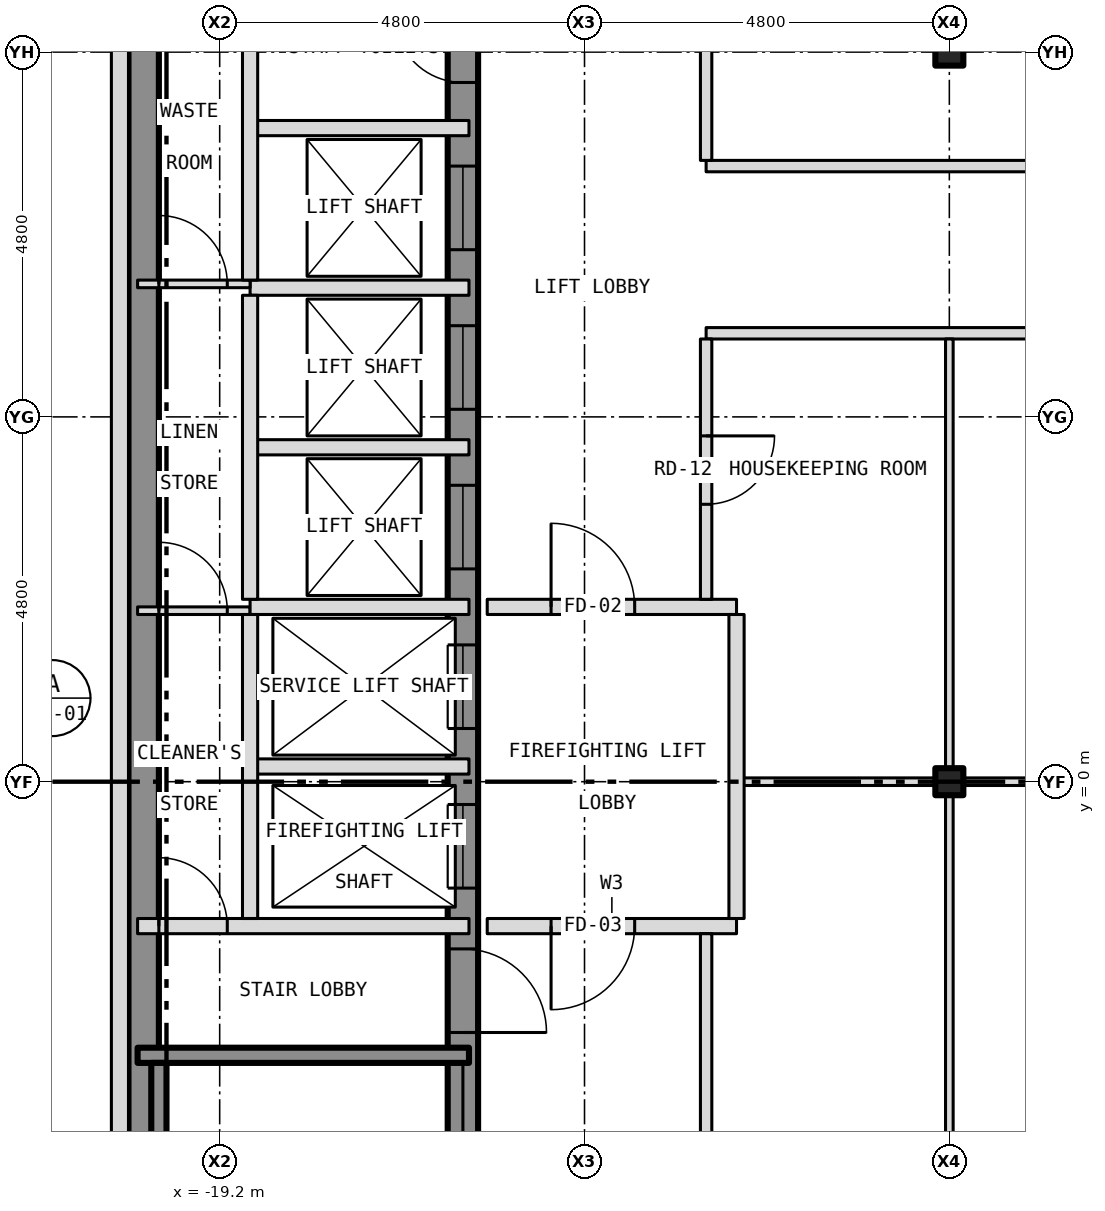
"""IFC4 building model, lengths in metres.
Left out: names, types, materials, properties, quantities, classifications, styles, units other than length and angle.
Written with IfcOpenShell. Run it as: python <this file> out.ifc"""

import sys

from ifc_helpers import new_model, si_unit, direction, frame, frame_2d, origin, origin_2d, place, context, subcontext, project, spatial, rectangle, i_section, extrude, element, fill, save


model = new_model("IFC4")
c1 = context("Model", 3, precision=1e-05, world=origin(), true_north=direction((0.0, 1.0)))
c2 = subcontext(c1, "Body", "Model", "MODEL_VIEW")
j1 = project(units=[si_unit("LENGTHUNIT", "METRE"), si_unit("PLANEANGLEUNIT", "RADIAN")], contexts=[c1])
p1 = place(None, origin())
s1 = spatial("IfcSite", under=j1, at=p1, CompositionType="ELEMENT")
p2 = place(p1, origin())
s2 = spatial("IfcBuilding", under=s1, at=p2, CompositionType="ELEMENT")
p3 = place(p2, frame((0.0, 0.0, 251.5)))
s3 = spatial("IfcBuildingStorey", under=s2, at=p3, CompositionType="ELEMENT", Elevation=251.5)
for number, where, z_axis, x_axis in (
    (1, (-9.6, 0.0, -0.15), (0.0, 0.0, 1.0), (1.0, 0.0, 0.0)),
    (2, (-9.6, 9.6, -0.15), (0.0, 0.0, 1.0), (1.0, 0.0, 0.0)),
):
    element("IfcColumn", number, at=place(p3, frame(where, z_axis=z_axis, x_axis=x_axis)), inside=s3, PredefinedType="COLUMN", context=c2, shape_type="SweptSolid", body=[
        extrude(i_section(OverallWidth=0.368, OverallDepth=0.356, WebThickness=0.011, FlangeThickness=0.018, at=origin_2d()), origin(), (0.0, 0.0, 1.0), 3.5),
    ])
p4 = place(p3, frame((-16.0, -10.8, 0.0), z_axis=(0.0, 0.0, 1.0), x_axis=(0.0, 1.0, 0.0)))
e3 = element("IfcWall", 3, at=p4, inside=s3, PredefinedType="SHEAR", context=c2, shape_type="SweptSolid", body=[
    extrude(rectangle(XDim=21.6, YDim=0.4, at=frame_2d((10.8, 0.0))), origin(), (0.0, 0.0, 1.0), 3.25),
])
p5 = place(p4, frame((9.4, 0.0, 0.0)))
e4 = element("IfcOpeningElement", 4, at=p5, cuts=e3, PredefinedType="OPENING", context=c2, shape_type="SweptSolid", body=[
    extrude(rectangle(XDim=1.1, YDim=2.1, at=frame_2d((0.55, 1.05))), frame((0.0, 0.212, 0.0), z_axis=(0.0, -1.0, 0.0), x_axis=(1.0, 0.0, 0.0)), (0.0, 0.0, 1.0), 0.424),
])
p6 = place(p4, frame((11.5, 0.0, 0.0)))
e5 = element("IfcOpeningElement", 5, at=p6, cuts=e3, PredefinedType="OPENING", context=c2, shape_type="SweptSolid", body=[
    extrude(rectangle(XDim=1.1, YDim=2.1, at=frame_2d((0.55, 1.05))), frame((0.0, 0.212, 0.0), z_axis=(0.0, -1.0, 0.0), x_axis=(1.0, 0.0, 0.0)), (0.0, 0.0, 1.0), 0.424),
])
p7 = place(p4, frame((13.6, 0.0, 0.0)))
e6 = element("IfcOpeningElement", 6, at=p7, cuts=e3, PredefinedType="OPENING", context=c2, shape_type="SweptSolid", body=[
    extrude(rectangle(XDim=1.1, YDim=2.1, at=frame_2d((0.55, 1.05))), frame((0.0, 0.212, 0.0), z_axis=(0.0, -1.0, 0.0), x_axis=(1.0, 0.0, 0.0)), (0.0, 0.0, 1.0), 0.424),
])
p8 = place(p4, frame((15.7, 0.0, 0.0)))
e7 = element("IfcOpeningElement", 7, at=p8, cuts=e3, PredefinedType="OPENING", context=c2, shape_type="SweptSolid", body=[
    extrude(rectangle(XDim=1.1, YDim=2.1, at=frame_2d((0.55, 1.05))), frame((0.0, 0.212, 0.0), z_axis=(0.0, -1.0, 0.0), x_axis=(1.0, 0.0, 0.0)), (0.0, 0.0, 1.0), 0.424),
])
p9 = place(p4, frame((17.8, 0.0, 0.0)))
e8 = element("IfcOpeningElement", 8, at=p9, cuts=e3, PredefinedType="OPENING", context=c2, shape_type="SweptSolid", body=[
    extrude(rectangle(XDim=1.1, YDim=2.1, at=frame_2d((0.55, 1.05))), frame((0.0, 0.212, 0.0), z_axis=(0.0, -1.0, 0.0), x_axis=(1.0, 0.0, 0.0)), (0.0, 0.0, 1.0), 0.424),
])
p10 = place(p4, frame((0.458, 0.0, 0.0)))
e9 = element("IfcOpeningElement", 9, at=p10, cuts=e3, PredefinedType="OPENING", context=c2, shape_type="SweptSolid", body=[
    extrude(rectangle(XDim=1.1, YDim=2.1, at=frame_2d((0.55, 1.05))), frame((0.0, 0.212, 0.0), z_axis=(0.0, -1.0, 0.0), x_axis=(1.0, 0.0, 0.0)), (0.0, 0.0, 1.0), 0.424),
])
p11 = place(p4, frame((7.5, 0.0, 0.0)))
e10 = element("IfcOpeningElement", 10, at=p11, cuts=e3, PredefinedType="OPENING", context=c2, shape_type="SweptSolid", body=[
    extrude(rectangle(XDim=1.1, YDim=2.1, at=frame_2d((0.55, 1.05))), frame((0.0, 0.212, 0.0), z_axis=(0.0, -1.0, 0.0), x_axis=(1.0, 0.0, 0.0)), (0.0, 0.0, 1.0), 0.424),
])
p12 = place(p4, frame((20.0, 0.0, 0.0)))
e11 = element("IfcOpeningElement", 11, at=p12, cuts=e3, PredefinedType="OPENING", context=c2, shape_type="SweptSolid", body=[
    extrude(rectangle(XDim=0.9, YDim=2.1, at=frame_2d((0.45, 1.05))), frame((0.0, 0.212, 0.0), z_axis=(0.0, -1.0, 0.0), x_axis=(1.0, 0.0, 0.0)), (0.0, 0.0, 1.0), 0.424),
])
p13 = place(p3, frame((-20.2, -10.8, 0.0), z_axis=(0.0, 0.0, 1.0), x_axis=(0.0, 1.0, 0.0)))
e12 = element("IfcWall", 12, at=p13, inside=s3, PredefinedType="SHEAR", context=c2, shape_type="SweptSolid", body=[
    extrude(rectangle(XDim=21.6, YDim=0.4, at=frame_2d((10.8, 0.0))), origin(), (0.0, 0.0, 1.0), 3.25),
])
p14 = place(p3, frame((-20.512, 10.8, 0.0), z_axis=(0.0, 0.0, 1.0), x_axis=(0.0, -1.0, 0.0)))
e13 = element("IfcWall", 13, at=p14, inside=s3, PredefinedType="SOLIDWALL", context=c2, shape_type="SweptSolid", body=[
    extrude(rectangle(XDim=21.6, YDim=0.225, at=frame_2d((10.8, 0.0))), origin(), (0.0, 0.0, 1.0), 3.5),
])
p15 = place(p14, frame((18.05, 0.0, 1.0)))
e14 = element("IfcOpeningElement", 14, at=p15, cuts=e13, PredefinedType="OPENING", context=c2, shape_type="SweptSolid", body=[
    extrude(rectangle(XDim=0.6, YDim=1.5, at=frame_2d((0.3, 0.75))), frame((0.0, 0.125, 0.0), z_axis=(0.0, -1.0, 0.0), x_axis=(1.0, 0.0, 0.0)), (0.0, 0.0, 1.0), 0.249),
])
p16 = place(p3, frame((-20.28, -3.6, 0.0), z_axis=(0.0, 0.0, 1.0), x_axis=(1.0, 0.0, 0.0)))
e15 = element("IfcWall", 15, at=p16, inside=s3, PredefinedType="SHEAR", context=c2, shape_type="SweptSolid", body=[
    extrude(rectangle(XDim=4.36, YDim=0.2, at=frame_2d((2.18, 0.0))), origin(), (0.0, 0.0, 1.0), 3.25),
])
p17 = place(p3, frame((-20.28, -1.9, 0.0), z_axis=(0.0, 0.0, 1.0), x_axis=(1.0, 0.0, 0.0)))
e16 = element("IfcWall", 16, at=p17, inside=s3, PredefinedType="PARTITIONING", context=c2, shape_type="SweptSolid", body=[
    extrude(rectangle(XDim=4.36, YDim=0.2, at=frame_2d((2.18, 0.0))), origin(), (0.0, 0.0, 1.0), 3.25),
])
p18 = place(p17, frame((0.28, 0.0, 0.0)))
e17 = element("IfcOpeningElement", 17, at=p18, cuts=e16, PredefinedType="OPENING", context=c2, shape_type="SweptSolid", body=[
    extrude(rectangle(XDim=0.9, YDim=2.1, at=frame_2d((0.45, 1.05))), frame((0.0, 0.112, 0.0), z_axis=(0.0, -1.0, 0.0), x_axis=(1.0, 0.0, 0.0)), (0.0, 0.0, 1.0), 0.224),
])
p19 = place(p3, frame((-15.68, -1.9, 0.0), z_axis=(0.0, 0.0, 1.0), x_axis=(1.0, 0.0, 0.0)))
e18 = element("IfcWall", 18, at=p19, inside=s3, PredefinedType="PARTITIONING", context=c2, shape_type="SweptSolid", body=[
    extrude(rectangle(XDim=3.28, YDim=0.2, at=frame_2d((1.64, 0.0))), origin(), (0.0, 0.0, 1.0), 3.35),
])
p20 = place(p19, frame((0.84, 0.0, 0.0)))
e19 = element("IfcOpeningElement", 19, at=p20, cuts=e18, PredefinedType="OPENING", context=c2, shape_type="SweptSolid", body=[
    extrude(rectangle(XDim=1.1, YDim=2.1, at=frame_2d((0.55, 1.05))), frame((0.0, 0.112, 0.0), z_axis=(0.0, -1.0, 0.0), x_axis=(1.0, 0.0, 0.0)), (0.0, 0.0, 1.0), 0.224),
])
p21 = place(p3, frame((-12.4, 0.0, 0.0), z_axis=(0.0, 0.0, 1.0), x_axis=(1.0, 0.0, 0.0)))
e20 = element("IfcWall", 20, at=p21, inside=s3, PredefinedType="PARTITIONING", context=c2, shape_type="SweptSolid", body=[
    extrude(rectangle(XDim=2.616, YDim=0.1, at=frame_2d((1.308, 0.0))), origin(), (0.0, 0.0, 1.0), 2.728),
])
p22 = place(p3, frame((-9.784, 0.0, 0.0), z_axis=(0.0, 0.0, 1.0), x_axis=(1.0, 0.0, 0.0)))
e21 = element("IfcWall", 21, at=p22, inside=s3, PredefinedType="PARTITIONING", context=c2, shape_type="SweptSolid", body=[
    extrude(rectangle(XDim=0.368, YDim=0.1, at=frame_2d((0.184, 0.0))), origin(), (0.0, 0.0, 1.0), 3.35),
])
p23 = place(p3, frame((-9.416, 0.0, 0.0), z_axis=(0.0, 0.0, 1.0), x_axis=(1.0, 0.0, 0.0)))
e22 = element("IfcWall", 22, at=p23, inside=s3, PredefinedType="PARTITIONING", context=c2, shape_type="SweptSolid", body=[
    extrude(rectangle(XDim=9.232, YDim=0.1, at=frame_2d((4.616, 0.0))), origin(), (0.0, 0.0, 1.0), 2.728),
])
p24 = place(p3, frame((-18.8, 0.2, 0.0), z_axis=(0.0, 0.0, 1.0), x_axis=(1.0, 0.0, 0.0)))
e23 = element("IfcWall", 23, at=p24, inside=s3, PredefinedType="PARTITIONING", context=c2, shape_type="SweptSolid", body=[
    extrude(rectangle(XDim=2.88, YDim=0.2, at=frame_2d((1.44, 0.0))), origin(), (0.0, 0.0, 1.0), 3.25),
])
p25 = place(p3, frame((-20.28, 2.25, 0.0), z_axis=(0.0, 0.0, 1.0), x_axis=(1.0, 0.0, 0.0)))
e24 = element("IfcWall", 24, at=p25, inside=s3, PredefinedType="PARTITIONING", context=c2, shape_type="SweptSolid", body=[
    extrude(rectangle(XDim=1.48, YDim=0.1, at=frame_2d((0.74, 0.0))), origin(), (0.0, 0.0, 1.0), 3.25),
])
p26 = place(p25, frame((0.28, 0.0, 0.0)))
e25 = element("IfcOpeningElement", 25, at=p26, cuts=e24, PredefinedType="OPENING", context=c2, shape_type="SweptSolid", body=[
    extrude(rectangle(XDim=0.9, YDim=2.1, at=frame_2d((0.45, 1.05))), frame((0.0, 0.062, 0.0), z_axis=(0.0, -1.0, 0.0), x_axis=(1.0, 0.0, 0.0)), (0.0, 0.0, 1.0), 0.124),
])
p27 = place(p3, frame((-18.8, 2.3, 0.0), z_axis=(0.0, 0.0, 1.0), x_axis=(1.0, 0.0, 0.0)))
e26 = element("IfcWall", 26, at=p27, inside=s3, PredefinedType="PARTITIONING", context=c2, shape_type="SweptSolid", body=[
    extrude(rectangle(XDim=2.88, YDim=0.2, at=frame_2d((1.44, 0.0))), origin(), (0.0, 0.0, 1.0), 3.25),
])
p28 = place(p3, frame((-15.68, 2.3, 0.0), z_axis=(0.0, 0.0, 1.0), x_axis=(1.0, 0.0, 0.0)))
e27 = element("IfcWall", 27, at=p28, inside=s3, PredefinedType="PARTITIONING", context=c2, shape_type="SweptSolid", body=[
    extrude(rectangle(XDim=3.28, YDim=0.2, at=frame_2d((1.64, 0.0))), origin(), (0.0, 0.0, 1.0), 3.35),
])
p29 = place(p28, frame((0.84, 0.0, 0.0)))
e28 = element("IfcOpeningElement", 28, at=p29, cuts=e27, PredefinedType="OPENING", context=c2, shape_type="SweptSolid", body=[
    extrude(rectangle(XDim=1.1, YDim=2.1, at=frame_2d((0.55, 1.05))), frame((0.0, 0.112, 0.0), z_axis=(0.0, -1.0, 0.0), x_axis=(1.0, 0.0, 0.0)), (0.0, 0.0, 1.0), 0.224),
])
p30 = place(p3, frame((-18.8, 4.4, 0.0), z_axis=(0.0, 0.0, 1.0), x_axis=(1.0, 0.0, 0.0)))
e29 = element("IfcWall", 29, at=p30, inside=s3, PredefinedType="PARTITIONING", context=c2, shape_type="SweptSolid", body=[
    extrude(rectangle(XDim=2.88, YDim=0.2, at=frame_2d((1.44, 0.0))), origin(), (0.0, 0.0, 1.0), 3.25),
])
p31 = place(p3, frame((-12.8, 5.9, 0.0), z_axis=(0.0, 0.0, 1.0), x_axis=(1.0, 0.0, 0.0)))
e30 = element("IfcWall", 30, at=p31, inside=s3, PredefinedType="PARTITIONING", context=c2, shape_type="SweptSolid", body=[
    extrude(rectangle(XDim=15.4, YDim=0.15, at=frame_2d((7.7, 0.0))), origin(), (0.0, 0.0, 1.0), 3.35),
])
p32 = place(p31, frame((8.85, 0.0, 0.0)))
e31 = element("IfcOpeningElement", 31, at=p32, cuts=e30, PredefinedType="OPENING", context=c2, shape_type="SweptSolid", body=[
    extrude(rectangle(XDim=0.9, YDim=2.1, at=frame_2d((0.45, 1.05))), frame((0.0, 0.087, 0.0), z_axis=(0.0, -1.0, 0.0), x_axis=(1.0, 0.0, 0.0)), (0.0, 0.0, 1.0), 0.174),
])
p33 = place(p3, frame((-18.8, 6.5, 0.0), z_axis=(0.0, 0.0, 1.0), x_axis=(1.0, 0.0, 0.0)))
e32 = element("IfcWall", 32, at=p33, inside=s3, PredefinedType="PARTITIONING", context=c2, shape_type="SweptSolid", body=[
    extrude(rectangle(XDim=2.88, YDim=0.2, at=frame_2d((1.44, 0.0))), origin(), (0.0, 0.0, 1.0), 3.25),
])
p34 = place(p3, frame((-20.28, 6.55, 0.0), z_axis=(0.0, 0.0, 1.0), x_axis=(1.0, 0.0, 0.0)))
e33 = element("IfcWall", 33, at=p34, inside=s3, PredefinedType="PARTITIONING", context=c2, shape_type="SweptSolid", body=[
    extrude(rectangle(XDim=1.48, YDim=0.1, at=frame_2d((0.74, 0.0))), origin(), (0.0, 0.0, 1.0), 3.25),
])
p35 = place(p34, frame((0.28, 0.0, 0.0)))
e34 = element("IfcOpeningElement", 34, at=p35, cuts=e33, PredefinedType="OPENING", context=c2, shape_type="SweptSolid", body=[
    extrude(rectangle(XDim=0.9, YDim=2.1, at=frame_2d((0.45, 1.05))), frame((0.0, 0.062, 0.0), z_axis=(0.0, -1.0, 0.0), x_axis=(1.0, 0.0, 0.0)), (0.0, 0.0, 1.0), 0.124),
])
p36 = place(p3, frame((-12.8, 8.1, 0.0), z_axis=(0.0, 0.0, 1.0), x_axis=(1.0, 0.0, 0.0)))
e35 = element("IfcWall", 35, at=p36, inside=s3, PredefinedType="PARTITIONING", context=c2, shape_type="SweptSolid", body=[
    extrude(rectangle(XDim=15.4, YDim=0.15, at=frame_2d((7.7, 0.0))), origin(), (0.0, 0.0, 1.0), 3.35),
])
p37 = place(p3, frame((-18.8, 8.6, 0.0), z_axis=(0.0, 0.0, 1.0), x_axis=(1.0, 0.0, 0.0)))
e36 = element("IfcWall", 36, at=p37, inside=s3, PredefinedType="PARTITIONING", context=c2, shape_type="SweptSolid", body=[
    extrude(rectangle(XDim=2.88, YDim=0.2, at=frame_2d((1.44, 0.0))), origin(), (0.0, 0.0, 1.0), 3.25),
])
p38 = place(p3, frame((-20.0, -10.68, 0.0), z_axis=(0.0, 0.0, 1.0), x_axis=(0.0, 1.0, 0.0)))
e37 = element("IfcWall", 37, at=p38, inside=s3, PredefinedType="SHEAR", context=c2, shape_type="SweptSolid", body=[
    extrude(rectangle(XDim=6.98, YDim=0.2, at=frame_2d((3.49, 0.0))), origin(), (0.0, 0.0, 1.0), 3.25),
])
for number, where, z_axis, x_axis in (
    (38, (-18.8, -1.8, 0.0), (0.0, 0.0, 1.0), (0.0, 1.0, 0.0)),
    (39, (-18.8, 2.4, 0.0), (0.0, 0.0, 1.0), (0.0, 1.0, 0.0)),
):
    element("IfcWall", number, at=place(p3, frame(where, z_axis=z_axis, x_axis=x_axis)), inside=s3, PredefinedType="PARTITIONING", context=c2, shape_type="SweptSolid", body=[
        extrude(rectangle(XDim=4.0, YDim=0.2, at=frame_2d((2.0, 0.0))), origin(), (0.0, 0.0, 1.0), 3.25),
    ])
p39 = place(p3, frame((-18.8, 6.6, 0.0), z_axis=(0.0, 0.0, 1.0), x_axis=(0.0, 1.0, 0.0)))
e40 = element("IfcWall", 40, at=p39, inside=s3, PredefinedType="PARTITIONING", context=c2, shape_type="SweptSolid", body=[
    extrude(rectangle(XDim=4.08, YDim=0.2, at=frame_2d((2.04, 0.0))), origin(), (0.0, 0.0, 1.0), 3.25),
])
p40 = place(p3, frame((-12.8, -10.525, 0.0), z_axis=(0.0, 0.0, 1.0), x_axis=(0.0, 1.0, 0.0)))
e41 = element("IfcWall", 41, at=p40, inside=s3, PredefinedType="PARTITIONING", context=c2, shape_type="SweptSolid", body=[
    extrude(rectangle(XDim=8.525, YDim=0.15, at=frame_2d((4.262, 0.0))), origin(), (0.0, 0.0, 1.0), 3.35),
])
p41 = place(p40, frame((3.825, 0.0, 0.0)))
e42 = element("IfcOpeningElement", 42, at=p41, cuts=e41, PredefinedType="OPENING", context=c2, shape_type="SweptSolid", body=[
    extrude(rectangle(XDim=0.9, YDim=2.1, at=frame_2d((0.45, 1.05))), frame((0.0, 0.087, 0.0), z_axis=(0.0, -1.0, 0.0), x_axis=(1.0, 0.0, 0.0)), (0.0, 0.0, 1.0), 0.174),
])
p42 = place(p3, frame((-12.8, 2.4, 0.0), z_axis=(0.0, 0.0, 1.0), x_axis=(0.0, 1.0, 0.0)))
e43 = element("IfcWall", 43, at=p42, inside=s3, PredefinedType="PARTITIONING", context=c2, shape_type="SweptSolid", body=[
    extrude(rectangle(XDim=3.425, YDim=0.15, at=frame_2d((1.712, 0.0))), origin(), (0.0, 0.0, 1.0), 3.35),
])
p43 = place(p42, frame((1.25, 0.0, 0.0)))
e44 = element("IfcOpeningElement", 44, at=p43, cuts=e43, PredefinedType="OPENING", context=c2, shape_type="SweptSolid", body=[
    extrude(rectangle(XDim=0.9, YDim=2.1, at=frame_2d((0.45, 1.05))), frame((0.0, 0.087, 0.0), z_axis=(0.0, -1.0, 0.0), x_axis=(1.0, 0.0, 0.0)), (0.0, 0.0, 1.0), 0.174),
])
p44 = place(p3, frame((-12.8, 8.175, 0.0), z_axis=(0.0, 0.0, 1.0), x_axis=(0.0, 1.0, 0.0)))
e45 = element("IfcWall", 45, at=p44, inside=s3, PredefinedType="PARTITIONING", context=c2, shape_type="SweptSolid", body=[
    extrude(rectangle(XDim=2.375, YDim=0.15, at=frame_2d((1.188, 0.0))), origin(), (0.0, 0.0, 1.0), 3.35),
])
p45 = place(p3, frame((-12.4, -1.8, 0.0), z_axis=(0.0, 0.0, 1.0), x_axis=(0.0, 1.0, 0.0)))
e46 = element("IfcWall", 46, at=p45, inside=s3, PredefinedType="PARTITIONING", context=c2, shape_type="SweptSolid", body=[
    extrude(rectangle(XDim=4.0, YDim=0.2, at=frame_2d((2.0, 0.0))), origin(), (0.0, 0.0, 1.0), 3.35),
])
p46 = place(p3, frame((-9.6, -9.416, 0.0), z_axis=(0.0, 0.0, 1.0), x_axis=(0.0, 1.0, 0.0)))
e47 = element("IfcWall", 47, at=p46, inside=s3, PredefinedType="PARTITIONING", context=c2, shape_type="SweptSolid", body=[
    extrude(rectangle(XDim=9.366, YDim=0.1, at=frame_2d((4.683, 0.0))), origin(), (0.0, 0.0, 1.0), 2.728),
])
p47 = place(p3, frame((-9.6, 0.05, 0.0), z_axis=(0.0, 0.0, 1.0), x_axis=(0.0, 1.0, 0.0)))
e48 = element("IfcWall", 48, at=p47, inside=s3, PredefinedType="PARTITIONING", context=c2, shape_type="SweptSolid", body=[
    extrude(rectangle(XDim=5.775, YDim=0.1, at=frame_2d((2.887, 0.0))), origin(), (0.0, 0.0, 1.0), 2.728),
])
p48 = place(p5, origin())
e49 = element("IfcDoor", 49, at=p48, inside=s3, OperationType="SLIDING_TO_LEFT", PredefinedType="DOOR", context=c2, shape_type="SweptSolid", body=[
    extrude(rectangle(XDim=1.1, YDim=2.1, at=frame_2d((0.55, 1.05))), frame((0.0, 0.025, 0.0), z_axis=(0.0, -1.0, 0.0), x_axis=(1.0, 0.0, 0.0)), (0.0, 0.0, 1.0), 0.05),
])
fill(e4, e49)
p49 = place(p6, origin())
e50 = element("IfcDoor", 50, at=p49, inside=s3, OperationType="SLIDING_TO_LEFT", PredefinedType="DOOR", context=c2, shape_type="SweptSolid", body=[
    extrude(rectangle(XDim=1.1, YDim=2.1, at=frame_2d((0.55, 1.05))), frame((0.0, 0.025, 0.0), z_axis=(0.0, -1.0, 0.0), x_axis=(1.0, 0.0, 0.0)), (0.0, 0.0, 1.0), 0.05),
])
fill(e5, e50)
p50 = place(p7, origin())
e51 = element("IfcDoor", 51, at=p50, inside=s3, OperationType="SLIDING_TO_LEFT", PredefinedType="DOOR", context=c2, shape_type="SweptSolid", body=[
    extrude(rectangle(XDim=1.1, YDim=2.1, at=frame_2d((0.55, 1.05))), frame((0.0, 0.025, 0.0), z_axis=(0.0, -1.0, 0.0), x_axis=(1.0, 0.0, 0.0)), (0.0, 0.0, 1.0), 0.05),
])
fill(e6, e51)
p51 = place(p8, origin())
e52 = element("IfcDoor", 52, at=p51, inside=s3, OperationType="SLIDING_TO_LEFT", PredefinedType="DOOR", context=c2, shape_type="SweptSolid", body=[
    extrude(rectangle(XDim=1.1, YDim=2.1, at=frame_2d((0.55, 1.05))), frame((0.0, 0.025, 0.0), z_axis=(0.0, -1.0, 0.0), x_axis=(1.0, 0.0, 0.0)), (0.0, 0.0, 1.0), 0.05),
])
fill(e7, e52)
p52 = place(p9, origin())
e53 = element("IfcDoor", 53, at=p52, inside=s3, OperationType="SLIDING_TO_LEFT", PredefinedType="DOOR", context=c2, shape_type="SweptSolid", body=[
    extrude(rectangle(XDim=1.1, YDim=2.1, at=frame_2d((0.55, 1.05))), frame((0.0, 0.025, 0.0), z_axis=(0.0, -1.0, 0.0), x_axis=(1.0, 0.0, 0.0)), (0.0, 0.0, 1.0), 0.05),
])
fill(e8, e53)
p53 = place(p11, origin())
e54 = element("IfcDoor", 54, at=p53, inside=s3, OperationType="SINGLE_SWING_LEFT", PredefinedType="DOOR", context=c2, shape_type="SweptSolid", body=[
    extrude(rectangle(XDim=1.1, YDim=2.1, at=frame_2d((0.55, 1.05))), frame((0.0, 0.025, 0.0), z_axis=(0.0, -1.0, 0.0), x_axis=(1.0, 0.0, 0.0)), (0.0, 0.0, 1.0), 0.05),
])
fill(e10, e54)
p54 = place(p12, origin())
e55 = element("IfcDoor", 55, at=p54, inside=s3, OperationType="SINGLE_SWING_RIGHT", PredefinedType="DOOR", context=c2, shape_type="SweptSolid", body=[
    extrude(rectangle(XDim=0.9, YDim=2.1, at=frame_2d((0.45, 1.05))), frame((0.0, 0.025, 0.0), z_axis=(0.0, -1.0, 0.0), x_axis=(1.0, 0.0, 0.0)), (0.0, 0.0, 1.0), 0.05),
])
fill(e11, e55)
p55 = place(p18, origin())
e56 = element("IfcDoor", 56, at=p55, inside=s3, OperationType="SINGLE_SWING_LEFT", PredefinedType="DOOR", context=c2, shape_type="SweptSolid", body=[
    extrude(rectangle(XDim=0.9, YDim=2.1, at=frame_2d((0.45, 1.05))), frame((0.0, 0.025, 0.0), z_axis=(0.0, -1.0, 0.0), x_axis=(1.0, 0.0, 0.0)), (0.0, 0.0, 1.0), 0.05),
])
fill(e17, e56)
p56 = place(p26, origin())
e57 = element("IfcDoor", 57, at=p56, inside=s3, OperationType="SINGLE_SWING_LEFT", PredefinedType="DOOR", context=c2, shape_type="SweptSolid", body=[
    extrude(rectangle(XDim=0.9, YDim=2.1, at=frame_2d((0.45, 1.05))), frame((0.0, 0.025, 0.0), z_axis=(0.0, -1.0, 0.0), x_axis=(1.0, 0.0, 0.0)), (0.0, 0.0, 1.0), 0.05),
])
fill(e25, e57)
p57 = place(p35, origin())
e58 = element("IfcDoor", 58, at=p57, inside=s3, OperationType="SINGLE_SWING_LEFT", PredefinedType="DOOR", context=c2, shape_type="SweptSolid", body=[
    extrude(rectangle(XDim=0.9, YDim=2.1, at=frame_2d((0.45, 1.05))), frame((0.0, 0.025, 0.0), z_axis=(0.0, -1.0, 0.0), x_axis=(1.0, 0.0, 0.0)), (0.0, 0.0, 1.0), 0.05),
])
fill(e34, e58)
p58 = place(p29, origin())
e59 = element("IfcDoor", 59, at=p58, inside=s3, OperationType="SINGLE_SWING_LEFT", PredefinedType="DOOR", context=c2, shape_type="SweptSolid", body=[
    extrude(rectangle(XDim=1.1, YDim=2.1, at=frame_2d((0.55, 1.05))), frame((0.0, 0.025, 0.0), z_axis=(0.0, -1.0, 0.0), x_axis=(1.0, 0.0, 0.0)), (0.0, 0.0, 1.0), 0.05),
])
fill(e28, e59)
p59 = place(p20, origin())
e60 = element("IfcDoor", 60, at=p59, inside=s3, OperationType="SINGLE_SWING_LEFT", PredefinedType="DOOR", context=c2, shape_type="SweptSolid", body=[
    extrude(rectangle(XDim=1.1, YDim=2.1, at=frame_2d((0.55, 1.05))), frame((0.0, 0.025, 0.0), z_axis=(0.0, -1.0, 0.0), x_axis=(1.0, 0.0, 0.0)), (0.0, 0.0, 1.0), 0.05),
])
fill(e19, e60)
p60 = place(p43, origin())
e61 = element("IfcDoor", 61, at=p60, inside=s3, OperationType="SINGLE_SWING_RIGHT", PredefinedType="DOOR", context=c2, shape_type="SweptSolid", body=[
    extrude(rectangle(XDim=0.9, YDim=2.1, at=frame_2d((0.45, 1.05))), frame((0.0, 0.025, 0.0), z_axis=(0.0, -1.0, 0.0), x_axis=(1.0, 0.0, 0.0)), (0.0, 0.0, 1.0), 0.05),
])
fill(e44, e61)
save(model, sys.argv[1])
